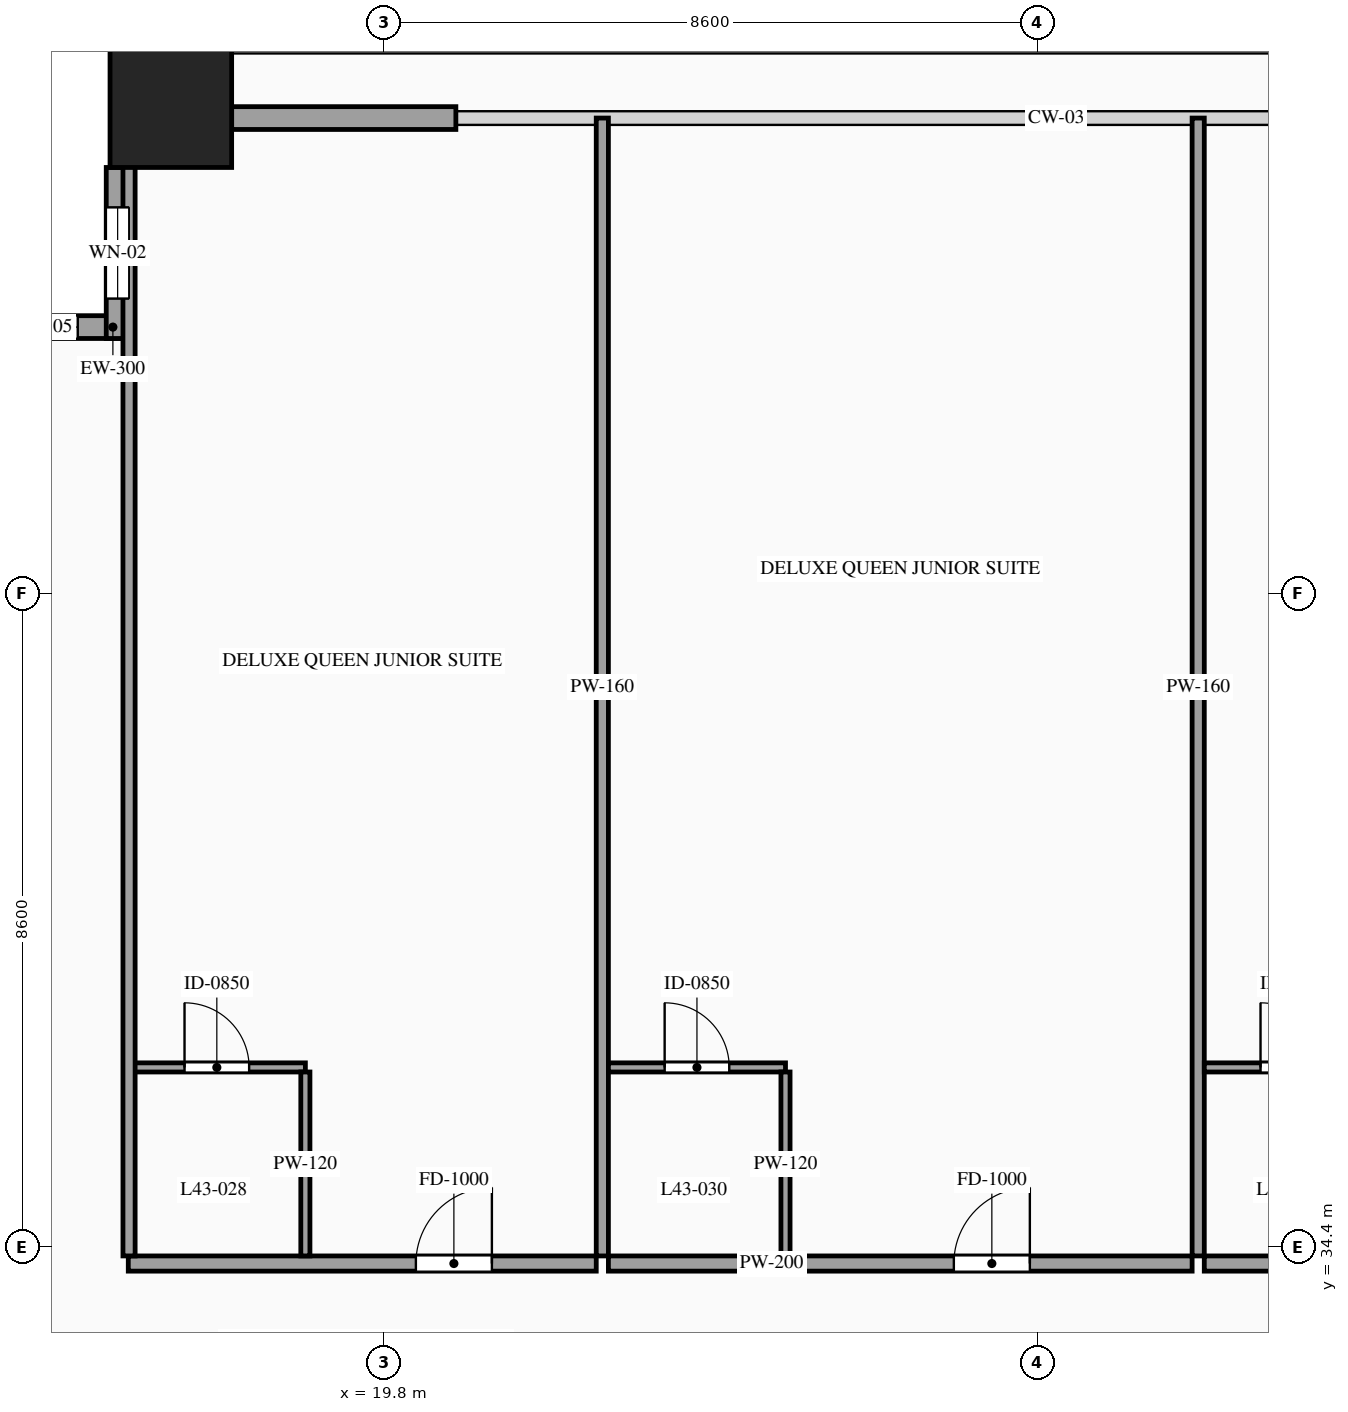
"""IFC4 building model, lengths in metres.
Left out: names, types, materials, properties, quantities, classifications, styles, units other than length and angle.
Written with IfcOpenShell. Run it as: python <this file> out.ifc"""

import sys

from ifc_helpers import new_model, si_unit, direction, frame, frame_2d, origin, origin_2d, place, context, subcontext, project, spatial, rectangle, hollow_rectangle, extrude, source, transform, mapped, element, fill, save


model = new_model("IFC4")
c1 = context("Model", 3, precision=1e-05, world=origin(), true_north=direction((0.0, 1.0)))
c2 = subcontext(c1, "Body", "Model", "MODEL_VIEW")
j1 = project(units=[si_unit("LENGTHUNIT", "METRE"), si_unit("PLANEANGLEUNIT", "RADIAN")], contexts=[c1])
p1 = place(None, origin())
s1 = spatial("IfcSite", under=j1, at=p1, CompositionType="ELEMENT")
p2 = place(p1, origin())
s2 = spatial("IfcBuilding", under=s1, at=p2, CompositionType="ELEMENT")
p3 = place(p2, frame((0.0, 0.0, 163.2)))
s3 = spatial("IfcBuildingStorey", under=s2, at=p3, CompositionType="ELEMENT", Elevation=163.2)
m1 = source(origin(), c2, "Body", "SweptSolid", [
    extrude(hollow_rectangle(XDim=1.6, YDim=1.6, WallThickness=0.07, at=origin_2d()), origin(), (0.0, 0.0, 1.0), 3.3),
])
p4 = place(p3, frame((17.0, 49.4, 0.0), z_axis=(0.0, 0.0, 1.0), x_axis=(1.0, 0.0, 0.0)))
e1 = element("IfcColumn", 1, at=p4, inside=s3, PredefinedType="COLUMN", context=c2, shape_type="MappedRepresentation", body=[
    mapped(m1, transform((0.0, 0.0, 0.0), scale=1.0)),
])
p5 = place(p3, frame((16.45, 46.5, 0.0), z_axis=(0.0, 0.0, 1.0), x_axis=(-1.0, 0.0, 0.0)))
e2 = element("IfcWall", 2, at=p5, inside=s3, PredefinedType="SOLIDWALL", context=c2, shape_type="SweptSolid", body=[
    extrude(rectangle(XDim=2.25, YDim=0.3, at=frame_2d((1.125, 0.0))), origin(), (0.0, 0.0, 1.0), 3.3),
])
p6 = place(p5, frame((0.675, 0.0, 0.85)))
e3 = element("IfcOpeningElement", 3, at=p6, cuts=e2, PredefinedType="OPENING", context=c2, shape_type="SweptSolid", body=[
    extrude(rectangle(XDim=0.9, YDim=1.5, at=frame_2d((0.45, 0.75))), frame((0.0, 0.165, 0.0), z_axis=(0.0, -1.0, 0.0), x_axis=(1.0, 0.0, 0.0)), (0.0, 0.0, 1.0), 0.33),
])
p7 = place(p3, frame((16.3, 48.6, 0.0), z_axis=(0.0, 0.0, 1.0), x_axis=(0.0, -1.0, 0.0)))
e4 = element("IfcWall", 4, at=p7, inside=s3, PredefinedType="SOLIDWALL", context=c2, shape_type="SweptSolid", body=[
    extrude(rectangle(XDim=2.25, YDim=0.3, at=frame_2d((1.125, 0.0))), origin(), (0.0, 0.0, 1.0), 3.3),
])
p8 = place(p7, frame((0.525, 0.0, 0.85)))
e5 = element("IfcOpeningElement", 5, at=p8, cuts=e4, PredefinedType="OPENING", context=c2, shape_type="SweptSolid", body=[
    extrude(rectangle(XDim=1.2, YDim=2.1, at=frame_2d((0.6, 1.05))), frame((0.0, 0.165, 0.0), z_axis=(0.0, -1.0, 0.0), x_axis=(1.0, 0.0, 0.0)), (0.0, 0.0, 1.0), 0.33),
])
m2 = source(origin(), c2, "Body", "SweptSolid", [
    extrude(rectangle(XDim=2.95, YDim=0.3, at=frame_2d((1.475, 0.0))), origin(), (0.0, 0.0, 1.0), 2.695),
])
p9 = place(p3, frame((17.8, 49.25, 0.0), z_axis=(0.0, 0.0, 1.0), x_axis=(1.0, 0.0, 0.0)))
e6 = element("IfcWall", 6, at=p9, inside=s3, PredefinedType="SOLIDWALL", context=c2, shape_type="MappedRepresentation", body=[
    mapped(m2, transform((0.0, 0.0, 0.0), scale=1.0)),
])
p10 = place(p3, frame((16.44, 34.18, 0.0), z_axis=(0.0, 0.0, 1.0), x_axis=(1.0, 0.0, 0.0)))
e7 = element("IfcWall", 7, at=p10, inside=s3, PredefinedType="PARTITIONING", context=c2, shape_type="SweptSolid", body=[
    extrude(rectangle(XDim=6.157, YDim=0.2, at=frame_2d((3.079, 0.0))), origin(), (0.0, 0.0, 1.0), 3.3),
])
p11 = place(p10, frame((3.784, 0.0, 0.0)))
e8 = element("IfcOpeningElement", 8, at=p11, cuts=e7, PredefinedType="OPENING", context=c2, shape_type="SweptSolid", body=[
    extrude(rectangle(XDim=1.0, YDim=2.2, at=frame_2d((0.5, 1.1))), frame((0.0, 0.115, 0.0), z_axis=(0.0, -1.0, 0.0), x_axis=(1.0, 0.0, 0.0)), (0.0, 0.0, 1.0), 0.23),
])
m3 = source(origin(), c2, "Body", "SweptSolid", [
    extrude(rectangle(XDim=14.97, YDim=0.16, at=frame_2d((7.485, 0.0))), origin(), (0.0, 0.0, 1.0), 3.3),
])
p12 = place(p3, frame((22.677, 34.28, 0.0), z_axis=(0.0, 0.0, 1.0), x_axis=(0.0, 1.0, 0.0)))
e9 = element("IfcWall", 9, at=p12, inside=s3, PredefinedType="PARTITIONING", context=c2, shape_type="MappedRepresentation", body=[
    mapped(m3, transform((0.0, 0.0, 0.0), scale=1.0)),
])
p13 = place(p3, frame((16.44, 36.76, 0.0), z_axis=(0.0, 0.0, 1.0), x_axis=(1.0, 0.0, 0.0)))
e10 = element("IfcWall", 10, at=p13, inside=s3, PredefinedType="PARTITIONING", context=c2, shape_type="SweptSolid", body=[
    extrude(rectangle(XDim=2.33, YDim=0.12, at=frame_2d((1.165, 0.0))), origin(), (0.0, 0.0, 1.0), 3.3),
])
p14 = place(p13, frame((0.74, 0.0, 0.0)))
e11 = element("IfcOpeningElement", 11, at=p14, cuts=e10, PredefinedType="OPENING", context=c2, shape_type="SweptSolid", body=[
    extrude(rectangle(XDim=0.85, YDim=2.1, at=frame_2d((0.425, 1.05))), frame((0.0, 0.075, 0.0), z_axis=(0.0, -1.0, 0.0), x_axis=(1.0, 0.0, 0.0)), (0.0, 0.0, 1.0), 0.15),
])
m4 = source(origin(), c2, "Body", "SweptSolid", [
    extrude(rectangle(XDim=2.42, YDim=0.12, at=frame_2d((1.21, 0.0))), origin(), (0.0, 0.0, 1.0), 3.3),
])
p15 = place(p3, frame((18.77, 34.28, 0.0), z_axis=(0.0, 0.0, 1.0), x_axis=(0.0, 1.0, 0.0)))
e12 = element("IfcWall", 12, at=p15, inside=s3, PredefinedType="PARTITIONING", context=c2, shape_type="MappedRepresentation", body=[
    mapped(m4, transform((0.0, 0.0, 0.0), scale=1.0)),
])
p16 = place(p3, frame((22.757, 34.18, 0.0), z_axis=(0.0, 0.0, 1.0), x_axis=(1.0, 0.0, 0.0)))
e13 = element("IfcWall", 13, at=p16, inside=s3, PredefinedType="PARTITIONING", context=c2, shape_type="SweptSolid", body=[
    extrude(rectangle(XDim=7.68, YDim=0.2, at=frame_2d((3.84, 0.0))), origin(), (0.0, 0.0, 1.0), 3.3),
])
p17 = place(p16, frame((4.545, 0.0, 0.0)))
e14 = element("IfcOpeningElement", 14, at=p17, cuts=e13, PredefinedType="OPENING", context=c2, shape_type="SweptSolid", body=[
    extrude(rectangle(XDim=1.0, YDim=2.2, at=frame_2d((0.5, 1.1))), frame((0.0, 0.115, 0.0), z_axis=(0.0, -1.0, 0.0), x_axis=(1.0, 0.0, 0.0)), (0.0, 0.0, 1.0), 0.23),
])
p18 = place(p3, frame((30.517, 34.28, 0.0), z_axis=(0.0, 0.0, 1.0), x_axis=(0.0, 1.0, 0.0)))
e15 = element("IfcWall", 15, at=p18, inside=s3, PredefinedType="PARTITIONING", context=c2, shape_type="MappedRepresentation", body=[
    mapped(m3, transform((0.0, 0.0, 0.0), scale=1.0)),
])
p19 = place(p3, frame((22.757, 36.76, 0.0), z_axis=(0.0, 0.0, 1.0), x_axis=(1.0, 0.0, 0.0)))
e16 = element("IfcWall", 16, at=p19, inside=s3, PredefinedType="PARTITIONING", context=c2, shape_type="SweptSolid", body=[
    extrude(rectangle(XDim=2.33, YDim=0.12, at=frame_2d((1.165, 0.0))), origin(), (0.0, 0.0, 1.0), 3.3),
])
p20 = place(p19, frame((0.74, 0.0, 0.0)))
e17 = element("IfcOpeningElement", 17, at=p20, cuts=e16, PredefinedType="OPENING", context=c2, shape_type="SweptSolid", body=[
    extrude(rectangle(XDim=0.85, YDim=2.1, at=frame_2d((0.425, 1.05))), frame((0.0, 0.075, 0.0), z_axis=(0.0, -1.0, 0.0), x_axis=(1.0, 0.0, 0.0)), (0.0, 0.0, 1.0), 0.15),
])
p21 = place(p3, frame((25.087, 34.28, 0.0), z_axis=(0.0, 0.0, 1.0), x_axis=(0.0, 1.0, 0.0)))
e18 = element("IfcWall", 18, at=p21, inside=s3, PredefinedType="PARTITIONING", context=c2, shape_type="MappedRepresentation", body=[
    mapped(m4, transform((0.0, 0.0, 0.0), scale=1.0)),
])
p22 = place(p3, frame((30.597, 34.18, 0.0), z_axis=(0.0, 0.0, 1.0), x_axis=(1.0, 0.0, 0.0)))
e19 = element("IfcWall", 19, at=p22, inside=s3, PredefinedType="PARTITIONING", context=c2, shape_type="SweptSolid", body=[
    extrude(rectangle(XDim=6.323, YDim=0.2, at=frame_2d((3.162, 0.0))), origin(), (0.0, 0.0, 1.0), 3.3),
])
p23 = place(p22, frame((3.866, 0.0, 0.0)))
e20 = element("IfcOpeningElement", 20, at=p23, cuts=e19, PredefinedType="OPENING", context=c2, shape_type="SweptSolid", body=[
    extrude(rectangle(XDim=1.0, YDim=2.2, at=frame_2d((0.5, 1.1))), frame((0.0, 0.115, 0.0), z_axis=(0.0, -1.0, 0.0), x_axis=(1.0, 0.0, 0.0)), (0.0, 0.0, 1.0), 0.23),
])
p24 = place(p3, frame((30.597, 36.76, 0.0), z_axis=(0.0, 0.0, 1.0), x_axis=(1.0, 0.0, 0.0)))
e21 = element("IfcWall", 21, at=p24, inside=s3, PredefinedType="PARTITIONING", context=c2, shape_type="SweptSolid", body=[
    extrude(rectangle(XDim=2.33, YDim=0.12, at=frame_2d((1.165, 0.0))), origin(), (0.0, 0.0, 1.0), 3.3),
])
p25 = place(p24, frame((0.74, 0.0, 0.0)))
e22 = element("IfcOpeningElement", 22, at=p25, cuts=e21, PredefinedType="OPENING", context=c2, shape_type="SweptSolid", body=[
    extrude(rectangle(XDim=0.85, YDim=2.1, at=frame_2d((0.425, 1.05))), frame((0.0, 0.075, 0.0), z_axis=(0.0, -1.0, 0.0), x_axis=(1.0, 0.0, 0.0)), (0.0, 0.0, 1.0), 0.15),
])
m5 = source(origin(), c2, "Body", "SweptSolid", [
    extrude(rectangle(XDim=14.82, YDim=0.16, at=frame_2d((7.41, 0.0))), origin(), (0.0, 0.0, 1.0), 3.3),
])
p26 = place(p3, frame((16.45, 34.28, 0.0), z_axis=(0.0, 0.0, 1.0), x_axis=(0.0, 1.0, 0.0)))
e23 = element("IfcWall", 23, at=p26, inside=s3, PredefinedType="PARTITIONING", context=c2, shape_type="MappedRepresentation", body=[
    mapped(m5, transform((0.0, 0.0, 0.0), scale=1.0)),
])
m6 = source(origin(), c2, "Body", "SweptSolid", [
    extrude(rectangle(XDim=0.9, YDim=1.5, at=frame_2d((0.45, 0.75))), frame((0.0, 0.03, 0.0), z_axis=(0.0, -1.0, 0.0), x_axis=(1.0, 0.0, 0.0)), (0.0, 0.0, 1.0), 0.06),
])
p27 = place(p6, origin())
e24 = element("IfcWindow", 24, at=p27, inside=s3, PartitioningType="SINGLE_PANEL", PredefinedType="WINDOW", context=c2, shape_type="MappedRepresentation", body=[
    mapped(m6, transform((0.0, 0.0, 0.0), scale=1.0)),
])
fill(e3, e24)
m7 = source(origin(), c2, "Body", "SweptSolid", [
    extrude(rectangle(XDim=1.2, YDim=2.1, at=frame_2d((0.6, 1.05))), frame((0.0, 0.03, 0.0), z_axis=(0.0, -1.0, 0.0), x_axis=(1.0, 0.0, 0.0)), (0.0, 0.0, 1.0), 0.06),
])
p28 = place(p8, origin())
e25 = element("IfcWindow", 25, at=p28, inside=s3, PartitioningType="SINGLE_PANEL", PredefinedType="WINDOW", context=c2, shape_type="MappedRepresentation", body=[
    mapped(m7, transform((0.0, 0.0, 0.0), scale=1.0)),
])
fill(e5, e25)
m8 = source(origin(), c2, "Body", "SweptSolid", [
    extrude(rectangle(XDim=1.0, YDim=2.2, at=frame_2d((0.5, 1.1))), frame((0.0, 0.025, 0.0), z_axis=(0.0, -1.0, 0.0), x_axis=(1.0, 0.0, 0.0)), (0.0, 0.0, 1.0), 0.05),
])
p29 = place(p11, origin())
e26 = element("IfcDoor", 26, at=p29, inside=s3, OperationType="SINGLE_SWING_RIGHT", PredefinedType="DOOR", context=c2, shape_type="MappedRepresentation", body=[
    mapped(m8, transform((0.0, 0.0, 0.0), scale=1.0)),
])
fill(e8, e26)
m9 = source(origin(), c2, "Body", "SweptSolid", [
    extrude(rectangle(XDim=0.85, YDim=2.1, at=frame_2d((0.425, 1.05))), frame((0.0, 0.025, 0.0), z_axis=(0.0, -1.0, 0.0), x_axis=(1.0, 0.0, 0.0)), (0.0, 0.0, 1.0), 0.05),
])
p30 = place(p14, origin())
e27 = element("IfcDoor", 27, at=p30, inside=s3, OperationType="SINGLE_SWING_LEFT", PredefinedType="DOOR", context=c2, shape_type="MappedRepresentation", body=[
    mapped(m9, transform((0.0, 0.0, 0.0), scale=1.0)),
])
fill(e11, e27)
p31 = place(p17, origin())
e28 = element("IfcDoor", 28, at=p31, inside=s3, OperationType="SINGLE_SWING_RIGHT", PredefinedType="DOOR", context=c2, shape_type="MappedRepresentation", body=[
    mapped(m8, transform((0.0, 0.0, 0.0), scale=1.0)),
])
fill(e14, e28)
p32 = place(p20, origin())
e29 = element("IfcDoor", 29, at=p32, inside=s3, OperationType="SINGLE_SWING_LEFT", PredefinedType="DOOR", context=c2, shape_type="MappedRepresentation", body=[
    mapped(m9, transform((0.0, 0.0, 0.0), scale=1.0)),
])
fill(e17, e29)
p33 = place(p25, origin())
e30 = element("IfcDoor", 30, at=p33, inside=s3, OperationType="SINGLE_SWING_LEFT", PredefinedType="DOOR", context=c2, shape_type="MappedRepresentation", body=[
    mapped(m9, transform((0.0, 0.0, 0.0), scale=1.0)),
])
fill(e22, e30)
save(model, sys.argv[1])
